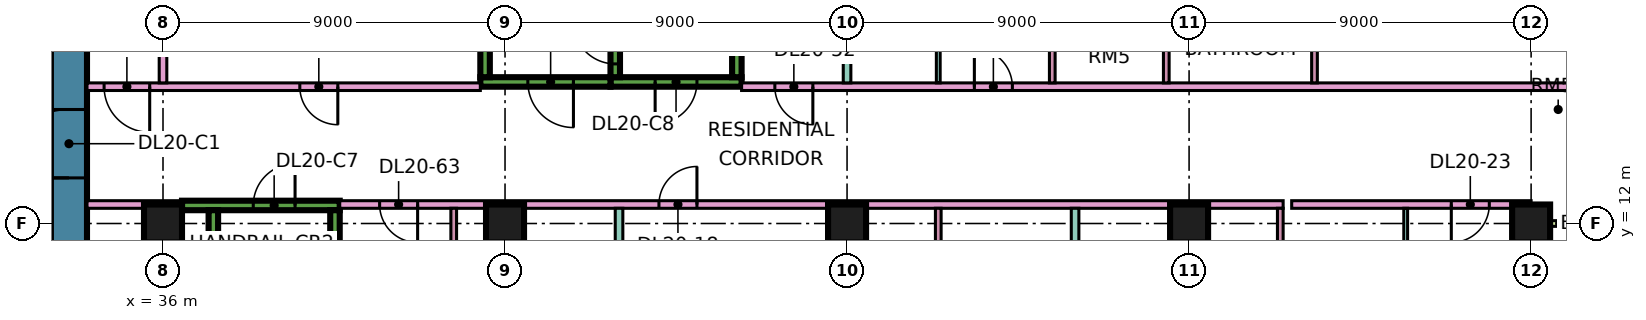
"""IFC4 building model, lengths in metres.
Left out: names, types, materials, properties, quantities, classifications, styles, units other than length and angle.
Written with IfcOpenShell. Run it as: python <this file> out.ifc"""

import sys

from ifc_helpers import new_model, si_unit, direction, frame, frame_2d, origin, origin_2d, place, context, subcontext, project, spatial, rectangle, extrude, element, fill, save


model = new_model("IFC4")
c1 = context("Model", 3, precision=1e-05, world=origin(), true_north=direction((0.0, 1.0)))
c2 = subcontext(c1, "Body", "Model", "MODEL_VIEW")
j1 = project(units=[si_unit("LENGTHUNIT", "METRE"), si_unit("PLANEANGLEUNIT", "RADIAN")], contexts=[c1])
p1 = place(None, origin())
s1 = spatial("IfcSite", under=j1, at=p1, CompositionType="ELEMENT")
p2 = place(p1, origin())
s2 = spatial("IfcBuilding", under=s1, at=p2, CompositionType="ELEMENT")
p3 = place(p2, frame((0.0, 0.0, 91.9)))
s3 = spatial("IfcBuildingStorey", under=s2, at=p3, CompositionType="ELEMENT", Elevation=91.9)
for number, where, z_axis, x_axis in (
    (1, (36.0, 12.0, 0.0), (0.0, 0.0, 1.0), (1.0, 0.0, 0.0)),
    (2, (45.0, 12.0, 0.0), (0.0, 0.0, 1.0), (1.0, 0.0, 0.0)),
    (3, (54.0, 12.0, 0.0), (0.0, 0.0, 1.0), (1.0, 0.0, 0.0)),
    (4, (63.0, 12.0, 0.0), (0.0, 0.0, 1.0), (1.0, 0.0, 0.0)),
    (5, (72.0, 12.0, 0.0), (0.0, 0.0, 1.0), (1.0, 0.0, 0.0)),
):
    element("IfcColumn", number, at=place(p3, frame(where, z_axis=z_axis, x_axis=x_axis)), inside=s3, PredefinedType="COLUMN", context=c2, shape_type="SweptSolid", body=[
        extrude(rectangle(XDim=1.0, YDim=1.0, at=origin_2d()), origin(), (0.0, 0.0, 1.0), 3.75),
    ])
p4 = place(p3, frame((33.525, 7.95, 0.0), z_axis=(0.0, 0.0, 1.0), x_axis=(0.0, 1.0, 0.0)))
e6 = element("IfcWall", 6, at=p4, inside=s3, PredefinedType="SHEAR", context=c2, shape_type="SweptSolid", body=[
    extrude(rectangle(XDim=11.1, YDim=0.95, at=frame_2d((5.55, 0.0))), origin(), (0.0, 0.0, 1.0), 3.75),
])
p5 = place(p4, frame((5.25, 0.0, 0.0)))
e7 = element("IfcOpeningElement", 7, at=p5, cuts=e6, PredefinedType="OPENING", context=c2, shape_type="SweptSolid", body=[
    extrude(rectangle(XDim=1.8, YDim=2.4, at=frame_2d((0.9, 1.2))), frame((0.0, 0.485, 0.0), z_axis=(0.0, -1.0, 0.0), x_axis=(1.0, 0.0, 0.0)), (0.0, 0.0, 1.0), 0.97),
])
p6 = place(p3, frame((36.5, 12.475, 0.0), z_axis=(0.0, 0.0, 1.0), x_axis=(1.0, 0.0, 0.0)))
e8 = element("IfcWall", 8, at=p6, inside=s3, PredefinedType="SHEAR", context=c2, shape_type="SweptSolid", body=[
    extrude(rectangle(XDim=4.15, YDim=0.25, at=frame_2d((2.075, 0.0))), origin(), (0.0, 0.0, 1.0), 3.75),
])
p7 = place(p6, frame((1.875, 0.0, 0.0)))
e9 = element("IfcOpeningElement", 9, at=p7, cuts=e8, PredefinedType="OPENING", context=c2, shape_type="SweptSolid", body=[
    extrude(rectangle(XDim=1.1, YDim=2.2, at=frame_2d((0.55, 1.1))), frame((0.0, 0.135, 0.0), z_axis=(0.0, -1.0, 0.0), x_axis=(1.0, 0.0, 0.0)), (0.0, 0.0, 1.0), 0.27),
])
for number, where, z_axis, x_axis in (
    (10, (37.325, 5.85, 0.0), (0.0, 0.0, 1.0), (0.0, 1.0, 0.0)),
    (11, (40.525, 5.85, 0.0), (0.0, 0.0, 1.0), (0.0, 1.0, 0.0)),
):
    element("IfcWall", number, at=place(p3, frame(where, z_axis=z_axis, x_axis=x_axis)), inside=s3, PredefinedType="SHEAR", context=c2, shape_type="SweptSolid", body=[
        extrude(rectangle(XDim=6.5, YDim=0.25, at=frame_2d((3.25, 0.0))), origin(), (0.0, 0.0, 1.0), 3.75),
    ])
p8 = place(p3, frame((47.775, 15.725, 0.0), z_axis=(0.0, 0.0, 1.0), x_axis=(1.0, 0.0, 0.0)))
e12 = element("IfcWall", 12, at=p8, inside=s3, PredefinedType="SHEAR", context=c2, shape_type="SweptSolid", body=[
    extrude(rectangle(XDim=3.45, YDim=0.25, at=frame_2d((1.725, 0.0))), origin(), (0.0, 0.0, 1.0), 3.75),
])
p9 = place(p8, frame((1.175, 0.0, 0.0)))
e13 = element("IfcOpeningElement", 13, at=p9, cuts=e12, PredefinedType="OPENING", context=c2, shape_type="SweptSolid", body=[
    extrude(rectangle(XDim=1.1, YDim=2.2, at=frame_2d((0.55, 1.1))), frame((0.0, 0.135, 0.0), z_axis=(0.0, -1.0, 0.0), x_axis=(1.0, 0.0, 0.0)), (0.0, 0.0, 1.0), 0.27),
])
p10 = place(p3, frame((47.9, 15.85, 0.0), z_axis=(0.0, 0.0, 1.0), x_axis=(0.0, 1.0, 0.0)))
e14 = element("IfcWall", 14, at=p10, inside=s3, PredefinedType="SHEAR", context=c2, shape_type="SweptSolid", body=[
    extrude(rectangle(XDim=6.5, YDim=0.25, at=frame_2d((3.25, 0.0))), origin(), (0.0, 0.0, 1.0), 3.75),
])
p11 = place(p10, frame((0.35, 0.0, 0.0)))
e15 = element("IfcOpeningElement", 15, at=p11, cuts=e14, PredefinedType="OPENING", context=c2, shape_type="SweptSolid", body=[
    extrude(rectangle(XDim=1.1, YDim=2.2, at=frame_2d((0.55, 1.1))), frame((0.0, 0.135, 0.0), z_axis=(0.0, -1.0, 0.0), x_axis=(1.0, 0.0, 0.0)), (0.0, 0.0, 1.0), 0.27),
])
p12 = place(p3, frame((51.1, 15.85, 0.0), z_axis=(0.0, 0.0, 1.0), x_axis=(0.0, 1.0, 0.0)))
e16 = element("IfcWall", 16, at=p12, inside=s3, PredefinedType="SHEAR", context=c2, shape_type="SweptSolid", body=[
    extrude(rectangle(XDim=6.5, YDim=0.25, at=frame_2d((3.25, 0.0))), origin(), (0.0, 0.0, 1.0), 3.75),
])
p13 = place(p3, frame((44.35, 15.725, 0.0), z_axis=(0.0, 0.0, 1.0), x_axis=(1.0, 0.0, 0.0)))
e17 = element("IfcWall", 17, at=p13, inside=s3, PredefinedType="SHEAR", context=c2, shape_type="SweptSolid", body=[
    extrude(rectangle(XDim=3.425, YDim=0.25, at=frame_2d((1.712, 0.0))), origin(), (0.0, 0.0, 1.0), 3.75),
])
p14 = place(p13, frame((1.25, 0.0, 0.0)))
e18 = element("IfcOpeningElement", 18, at=p14, cuts=e17, PredefinedType="OPENING", context=c2, shape_type="SweptSolid", body=[
    extrude(rectangle(XDim=1.2, YDim=2.2, at=frame_2d((0.6, 1.1))), frame((0.0, 0.135, 0.0), z_axis=(0.0, -1.0, 0.0), x_axis=(1.0, 0.0, 0.0)), (0.0, 0.0, 1.0), 0.27),
])
p15 = place(p3, frame((44.475, 15.85, 0.0), z_axis=(0.0, 0.0, 1.0), x_axis=(0.0, 1.0, 0.0)))
e19 = element("IfcWall", 19, at=p15, inside=s3, PredefinedType="SHEAR", context=c2, shape_type="SweptSolid", body=[
    extrude(rectangle(XDim=6.5, YDim=0.25, at=frame_2d((3.25, 0.0))), origin(), (0.0, 0.0, 1.0), 3.75),
])
p16 = place(p15, frame((1.75, 0.0, 0.0)))
e20 = element("IfcOpeningElement", 20, at=p16, cuts=e19, PredefinedType="OPENING", context=c2, shape_type="SweptSolid", body=[
    extrude(rectangle(XDim=1.1, YDim=2.2, at=frame_2d((0.55, 1.1))), frame((0.0, 0.135, 0.0), z_axis=(0.0, -1.0, 0.0), x_axis=(1.0, 0.0, 0.0)), (0.0, 0.0, 1.0), 0.27),
])
p17 = place(p15, frame((4.3, 0.0, 0.0)))
e21 = element("IfcOpeningElement", 21, at=p17, cuts=e19, PredefinedType="OPENING", context=c2, shape_type="SweptSolid", body=[
    extrude(rectangle(XDim=1.1, YDim=2.2, at=frame_2d((0.55, 1.1))), frame((0.0, 0.135, 0.0), z_axis=(0.0, -1.0, 0.0), x_axis=(1.0, 0.0, 0.0)), (0.0, 0.0, 1.0), 0.27),
])
p18 = place(p3, frame((72.0, 1.575, 0.0), z_axis=(0.0, 0.0, 1.0), x_axis=(0.0, 1.0, 0.0)))
e22 = element("IfcWall", 22, at=p18, inside=s3, PredefinedType="SOLIDWALL", context=c2, shape_type="SweptSolid", body=[
    extrude(rectangle(XDim=10.35, YDim=0.15, at=frame_2d((5.175, 0.0))), origin(), (0.0, 0.0, 1.0), 3.35),
])
p19 = place(p18, frame((4.012, 0.0, 0.0)))
e23 = element("IfcOpeningElement", 23, at=p19, cuts=e22, PredefinedType="OPENING", context=c2, shape_type="SweptSolid", body=[
    extrude(rectangle(XDim=1.8, YDim=2.4, at=frame_2d((0.9, 1.2))), frame((0.0, 0.085, 0.0), z_axis=(0.0, -1.0, 0.0), x_axis=(1.0, 0.0, 0.0)), (0.0, 0.0, 1.0), 0.17),
])
p20 = place(p3, frame((73.5, 12.0, 0.0), z_axis=(0.0, 0.0, 1.0), x_axis=(-1.0, 0.0, 0.0)))
e24 = element("IfcWall", 24, at=p20, inside=s3, PredefinedType="SOLIDWALL", context=c2, shape_type="SweptSolid", body=[
    extrude(rectangle(XDim=1.5, YDim=0.15, at=frame_2d((0.75, 0.0))), origin(), (0.0, 0.0, 1.0), 3.35),
])
p21 = place(p3, frame((34.0, 12.5, 0.0), z_axis=(0.0, 0.0, 1.0), x_axis=(1.0, 0.0, 0.0)))
e25 = element("IfcWall", 25, at=p21, inside=s3, PredefinedType="PARTITIONING", context=c2, shape_type="SweptSolid", body=[
    extrude(rectangle(XDim=2.501, YDim=0.2, at=frame_2d((1.25, 0.0))), origin(), (0.0, 0.0, 1.0), 3.35),
])
p22 = place(p3, frame((34.0, 15.6, 0.0), z_axis=(0.0, 0.0, 1.0), x_axis=(1.0, 0.0, 0.0)))
e26 = element("IfcWall", 26, at=p22, inside=s3, PredefinedType="PARTITIONING", context=c2, shape_type="SweptSolid", body=[
    extrude(rectangle(XDim=10.35, YDim=0.2, at=frame_2d((5.175, 0.0))), origin(), (0.0, 0.0, 1.0), 3.35),
])
p23 = place(p22, frame((5.6, 0.0, 0.0)))
e27 = element("IfcOpeningElement", 27, at=p23, cuts=e26, PredefinedType="OPENING", context=c2, shape_type="SweptSolid", body=[
    extrude(rectangle(XDim=1.0, YDim=2.1, at=frame_2d((0.5, 1.05))), frame((0.0, 0.11, 0.0), z_axis=(0.0, -1.0, 0.0), x_axis=(1.0, 0.0, 0.0)), (0.0, 0.0, 1.0), 0.22),
])
p24 = place(p22, frame((0.45, 0.0, 0.0)))
e28 = element("IfcOpeningElement", 28, at=p24, cuts=e26, PredefinedType="OPENING", context=c2, shape_type="SweptSolid", body=[
    extrude(rectangle(XDim=1.2, YDim=2.1, at=frame_2d((0.6, 1.05))), frame((0.0, 0.11, 0.0), z_axis=(0.0, -1.0, 0.0), x_axis=(1.0, 0.0, 0.0)), (0.0, 0.0, 1.0), 0.22),
])
p25 = place(p3, frame((36.0, 15.7, 0.0), z_axis=(0.0, 0.0, 1.0), x_axis=(0.0, 1.0, 0.0)))
e29 = element("IfcWall", 29, at=p25, inside=s3, PredefinedType="PARTITIONING", context=c2, shape_type="SweptSolid", body=[
    extrude(rectangle(XDim=8.3, YDim=0.2, at=frame_2d((4.15, 0.0))), origin(), (0.0, 0.0, 1.0), 3.35),
])
p26 = place(p3, frame((40.65, 12.5, 0.0), z_axis=(0.0, 0.0, 1.0), x_axis=(1.0, 0.0, 0.0)))
e30 = element("IfcWall", 30, at=p26, inside=s3, PredefinedType="PARTITIONING", context=c2, shape_type="SweptSolid", body=[
    extrude(rectangle(XDim=24.825, YDim=0.2, at=frame_2d((12.413, 0.0))), origin(), (0.0, 0.0, 1.0), 3.35),
])
p27 = place(p26, frame((8.4, 0.0, 0.0)))
e31 = element("IfcOpeningElement", 31, at=p27, cuts=e30, PredefinedType="OPENING", context=c2, shape_type="SweptSolid", body=[
    extrude(rectangle(XDim=1.0, YDim=2.1, at=frame_2d((0.5, 1.05))), frame((0.0, 0.11, 0.0), z_axis=(0.0, -1.0, 0.0), x_axis=(1.0, 0.0, 0.0)), (0.0, 0.0, 1.0), 0.22),
])
p28 = place(p26, frame((1.05, 0.0, 0.0)))
e32 = element("IfcOpeningElement", 32, at=p28, cuts=e30, PredefinedType="OPENING", context=c2, shape_type="SweptSolid", body=[
    extrude(rectangle(XDim=1.0, YDim=2.1, at=frame_2d((0.5, 1.05))), frame((0.0, 0.11, 0.0), z_axis=(0.0, -1.0, 0.0), x_axis=(1.0, 0.0, 0.0)), (0.0, 0.0, 1.0), 0.22),
])
p29 = place(p3, frame((43.65, 5.825, 0.0), z_axis=(0.0, 0.0, 1.0), x_axis=(0.0, 1.0, 0.0)))
e33 = element("IfcWall", 33, at=p29, inside=s3, PredefinedType="PARTITIONING", context=c2, shape_type="SweptSolid", body=[
    extrude(rectangle(XDim=6.575, YDim=0.15, at=frame_2d((3.288, 0.0))), origin(), (0.0, 0.0, 1.0), 3.35),
])
p30 = place(p29, frame((4.425, 0.0, 0.0)))
e34 = element("IfcOpeningElement", 34, at=p30, cuts=e33, PredefinedType="OPENING", context=c2, shape_type="SweptSolid", body=[
    extrude(rectangle(XDim=0.9, YDim=2.1, at=frame_2d((0.45, 1.05))), frame((0.0, 0.085, 0.0), z_axis=(0.0, -1.0, 0.0), x_axis=(1.0, 0.0, 0.0)), (0.0, 0.0, 1.0), 0.17),
])
p31 = place(p3, frame((48.0, 0.0, 0.0), z_axis=(0.0, 0.0, 1.0), x_axis=(0.0, 1.0, 0.0)))
e35 = element("IfcWall", 35, at=p31, inside=s3, PredefinedType="PARTITIONING", context=c2, shape_type="SweptSolid", body=[
    extrude(rectangle(XDim=12.4, YDim=0.2, at=frame_2d((6.2, 0.0))), origin(), (0.0, 0.0, 1.0), 3.35),
])
p32 = place(p3, frame((51.225, 15.6, 0.0), z_axis=(0.0, 0.0, 1.0), x_axis=(1.0, 0.0, 0.0)))
e36 = element("IfcWall", 36, at=p32, inside=s3, PredefinedType="PARTITIONING", context=c2, shape_type="SweptSolid", body=[
    extrude(rectangle(XDim=22.125, YDim=0.2, at=frame_2d((11.062, 0.0))), origin(), (0.0, 0.0, 1.0), 3.35),
])
p33 = place(p32, frame((6.125, 0.0, 0.0)))
e37 = element("IfcOpeningElement", 37, at=p33, cuts=e36, PredefinedType="OPENING", context=c2, shape_type="SweptSolid", body=[
    extrude(rectangle(XDim=1.0, YDim=2.1, at=frame_2d((0.5, 1.05))), frame((0.0, 0.11, 0.0), z_axis=(0.0, -1.0, 0.0), x_axis=(1.0, 0.0, 0.0)), (0.0, 0.0, 1.0), 0.22),
])
p34 = place(p32, frame((0.875, 0.0, 0.0)))
e38 = element("IfcOpeningElement", 38, at=p34, cuts=e36, PredefinedType="OPENING", context=c2, shape_type="SweptSolid", body=[
    extrude(rectangle(XDim=1.0, YDim=2.1, at=frame_2d((0.5, 1.05))), frame((0.0, 0.11, 0.0), z_axis=(0.0, -1.0, 0.0), x_axis=(1.0, 0.0, 0.0)), (0.0, 0.0, 1.0), 0.22),
])
p35 = place(p3, frame((54.0, 15.7, 0.0), z_axis=(0.0, 0.0, 1.0), x_axis=(0.0, 1.0, 0.0)))
e39 = element("IfcWall", 39, at=p35, inside=s3, PredefinedType="PARTITIONING", context=c2, shape_type="SweptSolid", body=[
    extrude(rectangle(XDim=8.226, YDim=0.2, at=frame_2d((4.113, 0.0))), origin(), (0.0, 0.0, 1.0), 3.35),
])
p36 = place(p3, frame((54.3, 7.775, 0.0), z_axis=(0.0, 0.0, 1.0), x_axis=(0.0, 1.0, 0.0)))
e40 = element("IfcWall", 40, at=p36, inside=s3, PredefinedType="PARTITIONING", context=c2, shape_type="SweptSolid", body=[
    extrude(rectangle(XDim=4.625, YDim=0.15, at=frame_2d((2.312, 0.0))), origin(), (0.0, 0.0, 1.0), 3.35),
])
p37 = place(p36, frame((1.875, 0.0, 0.0)))
e41 = element("IfcOpeningElement", 41, at=p37, cuts=e40, PredefinedType="OPENING", context=c2, shape_type="SweptSolid", body=[
    extrude(rectangle(XDim=0.8, YDim=2.1, at=frame_2d((0.4, 1.05))), frame((0.0, 0.085, 0.0), z_axis=(0.0, -1.0, 0.0), x_axis=(1.0, 0.0, 0.0)), (0.0, 0.0, 1.0), 0.17),
])
p38 = place(p3, frame((56.4, 7.775, 0.0), z_axis=(0.0, 0.0, 1.0), x_axis=(0.0, 1.0, 0.0)))
e42 = element("IfcWall", 42, at=p38, inside=s3, PredefinedType="PARTITIONING", context=c2, shape_type="SweptSolid", body=[
    extrude(rectangle(XDim=4.625, YDim=0.15, at=frame_2d((2.312, 0.0))), origin(), (0.0, 0.0, 1.0), 3.35),
])
p39 = place(p3, frame((56.4, 15.7, 0.0), z_axis=(0.0, 0.0, 1.0), x_axis=(0.0, 1.0, 0.0)))
e43 = element("IfcWall", 43, at=p39, inside=s3, PredefinedType="PARTITIONING", context=c2, shape_type="SweptSolid", body=[
    extrude(rectangle(XDim=2.65, YDim=0.1, at=frame_2d((1.325, 0.0))), origin(), (0.0, 0.0, 1.0), 3.35),
])
p40 = place(p3, frame((59.4, 15.7, 0.0), z_axis=(0.0, 0.0, 1.0), x_axis=(0.0, 1.0, 0.0)))
e44 = element("IfcWall", 44, at=p40, inside=s3, PredefinedType="PARTITIONING", context=c2, shape_type="SweptSolid", body=[
    extrude(rectangle(XDim=2.525, YDim=0.15, at=frame_2d((1.263, 0.0))), origin(), (0.0, 0.0, 1.0), 3.35),
])
p41 = place(p3, frame((60.0, 0.0, 0.0), z_axis=(0.0, 0.0, 1.0), x_axis=(0.0, 1.0, 0.0)))
e45 = element("IfcWall", 45, at=p41, inside=s3, PredefinedType="PARTITIONING", context=c2, shape_type="SweptSolid", body=[
    extrude(rectangle(XDim=12.4, YDim=0.2, at=frame_2d((6.2, 0.0))), origin(), (0.0, 0.0, 1.0), 3.35),
])
p42 = place(p3, frame((62.4, 15.7, 0.0), z_axis=(0.0, 0.0, 1.0), x_axis=(0.0, 1.0, 0.0)))
e46 = element("IfcWall", 46, at=p42, inside=s3, PredefinedType="PARTITIONING", context=c2, shape_type="SweptSolid", body=[
    extrude(rectangle(XDim=2.525, YDim=0.15, at=frame_2d((1.263, 0.0))), origin(), (0.0, 0.0, 1.0), 3.35),
])
for number, where, z_axis, x_axis in (
    (47, (63.3, 7.175, 0.0), (0.0, 0.0, 1.0), (0.0, 1.0, 0.0)),
    (48, (65.4, 7.175, 0.0), (0.0, 0.0, 1.0), (0.0, 1.0, 0.0)),
):
    element("IfcWall", number, at=place(p3, frame(where, z_axis=z_axis, x_axis=x_axis)), inside=s3, PredefinedType="PARTITIONING", context=c2, shape_type="SweptSolid", body=[
        extrude(rectangle(XDim=5.225, YDim=0.15, at=frame_2d((2.612, 0.0))), origin(), (0.0, 0.0, 1.0), 3.35),
    ])
p43 = place(p3, frame((65.7, 12.5, 0.0), z_axis=(0.0, 0.0, 1.0), x_axis=(1.0, 0.0, 0.0)))
e49 = element("IfcWall", 49, at=p43, inside=s3, PredefinedType="PARTITIONING", context=c2, shape_type="SweptSolid", body=[
    extrude(rectangle(XDim=6.3, YDim=0.2, at=frame_2d((3.15, 0.0))), origin(), (0.0, 0.0, 1.0), 3.35),
])
p44 = place(p43, frame((4.2, 0.0, 0.0)))
e50 = element("IfcOpeningElement", 50, at=p44, cuts=e49, PredefinedType="OPENING", context=c2, shape_type="SweptSolid", body=[
    extrude(rectangle(XDim=1.0, YDim=2.1, at=frame_2d((0.5, 1.05))), frame((0.0, 0.11, 0.0), z_axis=(0.0, -1.0, 0.0), x_axis=(1.0, 0.0, 0.0)), (0.0, 0.0, 1.0), 0.22),
])
p45 = place(p3, frame((66.3, 15.7, 0.0), z_axis=(0.0, 0.0, 1.0), x_axis=(0.0, 1.0, 0.0)))
e51 = element("IfcWall", 51, at=p45, inside=s3, PredefinedType="PARTITIONING", context=c2, shape_type="SweptSolid", body=[
    extrude(rectangle(XDim=2.525, YDim=0.15, at=frame_2d((1.263, 0.0))), origin(), (0.0, 0.0, 1.0), 3.35),
])
p46 = place(p3, frame((68.7, 7.05, 0.0), z_axis=(0.0, 0.0, 1.0), x_axis=(0.0, 1.0, 0.0)))
e52 = element("IfcWall", 52, at=p46, inside=s3, PredefinedType="PARTITIONING", context=c2, shape_type="SweptSolid", body=[
    extrude(rectangle(XDim=5.35, YDim=0.1, at=frame_2d((2.675, 0.0))), origin(), (0.0, 0.0, 1.0), 3.35),
])
p47 = place(p5, origin())
e53 = element("IfcDoor", 53, at=p47, inside=s3, OperationType="DOUBLE_DOOR_SINGLE_SWING", PredefinedType="DOOR", context=c2, shape_type="SweptSolid", body=[
    extrude(rectangle(XDim=1.8, YDim=2.4, at=frame_2d((0.9, 1.2))), frame((0.0, 0.025, 0.0), z_axis=(0.0, -1.0, 0.0), x_axis=(1.0, 0.0, 0.0)), (0.0, 0.0, 1.0), 0.05),
])
fill(e7, e53)
p48 = place(p7, frame((1.1, 0.0, 0.0), z_axis=(0.0, 0.0, 1.0), x_axis=(-1.0, 0.0, 0.0)))
e54 = element("IfcDoor", 54, at=p48, inside=s3, OperationType="SINGLE_SWING_RIGHT", PredefinedType="DOOR", context=c2, shape_type="SweptSolid", body=[
    extrude(rectangle(XDim=1.1, YDim=2.2, at=frame_2d((0.55, 1.1))), frame((0.0, 0.025, 0.0), z_axis=(0.0, -1.0, 0.0), x_axis=(1.0, 0.0, 0.0)), (0.0, 0.0, 1.0), 0.05),
])
fill(e9, e54)
p49 = place(p9, frame((1.1, 0.0, 0.0), z_axis=(0.0, 0.0, 1.0), x_axis=(-1.0, 0.0, 0.0)))
e55 = element("IfcDoor", 55, at=p49, inside=s3, OperationType="SINGLE_SWING_LEFT", PredefinedType="DOOR", context=c2, shape_type="SweptSolid", body=[
    extrude(rectangle(XDim=1.1, YDim=2.2, at=frame_2d((0.55, 1.1))), frame((0.0, 0.025, 0.0), z_axis=(0.0, -1.0, 0.0), x_axis=(1.0, 0.0, 0.0)), (0.0, 0.0, 1.0), 0.05),
])
fill(e13, e55)
p50 = place(p14, origin())
e56 = element("IfcDoor", 56, at=p50, inside=s3, OperationType="SINGLE_SWING_RIGHT", PredefinedType="DOOR", context=c2, shape_type="SweptSolid", body=[
    extrude(rectangle(XDim=1.2, YDim=2.2, at=frame_2d((0.6, 1.1))), frame((0.0, 0.025, 0.0), z_axis=(0.0, -1.0, 0.0), x_axis=(1.0, 0.0, 0.0)), (0.0, 0.0, 1.0), 0.05),
])
fill(e18, e56)
p51 = place(p11, frame((1.1, 0.0, 0.0), z_axis=(0.0, 0.0, 1.0), x_axis=(-1.0, 0.0, 0.0)))
e57 = element("IfcDoor", 57, at=p51, inside=s3, OperationType="SINGLE_SWING_RIGHT", PredefinedType="DOOR", context=c2, shape_type="SweptSolid", body=[
    extrude(rectangle(XDim=1.1, YDim=2.2, at=frame_2d((0.55, 1.1))), frame((0.0, 0.025, 0.0), z_axis=(0.0, -1.0, 0.0), x_axis=(1.0, 0.0, 0.0)), (0.0, 0.0, 1.0), 0.05),
])
fill(e15, e57)
p52 = place(p23, origin())
e58 = element("IfcDoor", 58, at=p52, inside=s3, OperationType="SINGLE_SWING_RIGHT", PredefinedType="DOOR", context=c2, shape_type="SweptSolid", body=[
    extrude(rectangle(XDim=1.0, YDim=2.1, at=frame_2d((0.5, 1.05))), frame((0.0, 0.025, 0.0), z_axis=(0.0, -1.0, 0.0), x_axis=(1.0, 0.0, 0.0)), (0.0, 0.0, 1.0), 0.05),
])
fill(e27, e58)
p53 = place(p33, origin())
e59 = element("IfcDoor", 59, at=p53, inside=s3, OperationType="SINGLE_SWING_LEFT", PredefinedType="DOOR", context=c2, shape_type="SweptSolid", body=[
    extrude(rectangle(XDim=1.0, YDim=2.1, at=frame_2d((0.5, 1.05))), frame((0.0, 0.025, 0.0), z_axis=(0.0, -1.0, 0.0), x_axis=(1.0, 0.0, 0.0)), (0.0, 0.0, 1.0), 0.05),
])
fill(e37, e59)
p54 = place(p27, frame((1.0, 0.0, 0.0), z_axis=(0.0, 0.0, 1.0), x_axis=(-1.0, 0.0, 0.0)))
e60 = element("IfcDoor", 60, at=p54, inside=s3, OperationType="SINGLE_SWING_RIGHT", PredefinedType="DOOR", context=c2, shape_type="SweptSolid", body=[
    extrude(rectangle(XDim=1.0, YDim=2.1, at=frame_2d((0.5, 1.05))), frame((0.0, 0.025, 0.0), z_axis=(0.0, -1.0, 0.0), x_axis=(1.0, 0.0, 0.0)), (0.0, 0.0, 1.0), 0.05),
])
fill(e31, e60)
p55 = place(p44, frame((1.0, 0.0, 0.0), z_axis=(0.0, 0.0, 1.0), x_axis=(-1.0, 0.0, 0.0)))
e61 = element("IfcDoor", 61, at=p55, inside=s3, OperationType="SINGLE_SWING_LEFT", PredefinedType="DOOR", context=c2, shape_type="SweptSolid", body=[
    extrude(rectangle(XDim=1.0, YDim=2.1, at=frame_2d((0.5, 1.05))), frame((0.0, 0.025, 0.0), z_axis=(0.0, -1.0, 0.0), x_axis=(1.0, 0.0, 0.0)), (0.0, 0.0, 1.0), 0.05),
])
fill(e50, e61)
p56 = place(p24, origin())
e62 = element("IfcDoor", 62, at=p56, inside=s3, OperationType="SINGLE_SWING_RIGHT", PredefinedType="DOOR", context=c2, shape_type="SweptSolid", body=[
    extrude(rectangle(XDim=1.2, YDim=2.1, at=frame_2d((0.6, 1.05))), frame((0.0, 0.025, 0.0), z_axis=(0.0, -1.0, 0.0), x_axis=(1.0, 0.0, 0.0)), (0.0, 0.0, 1.0), 0.05),
])
fill(e28, e62)
p57 = place(p34, origin())
e63 = element("IfcDoor", 63, at=p57, inside=s3, OperationType="SINGLE_SWING_RIGHT", PredefinedType="DOOR", context=c2, shape_type="SweptSolid", body=[
    extrude(rectangle(XDim=1.0, YDim=2.1, at=frame_2d((0.5, 1.05))), frame((0.0, 0.025, 0.0), z_axis=(0.0, -1.0, 0.0), x_axis=(1.0, 0.0, 0.0)), (0.0, 0.0, 1.0), 0.05),
])
fill(e38, e63)
p58 = place(p28, origin())
e64 = element("IfcDoor", 64, at=p58, inside=s3, OperationType="SINGLE_SWING_RIGHT", PredefinedType="DOOR", context=c2, shape_type="SweptSolid", body=[
    extrude(rectangle(XDim=1.0, YDim=2.1, at=frame_2d((0.5, 1.05))), frame((0.0, 0.025, 0.0), z_axis=(0.0, -1.0, 0.0), x_axis=(1.0, 0.0, 0.0)), (0.0, 0.0, 1.0), 0.05),
])
fill(e32, e64)
save(model, sys.argv[1])
